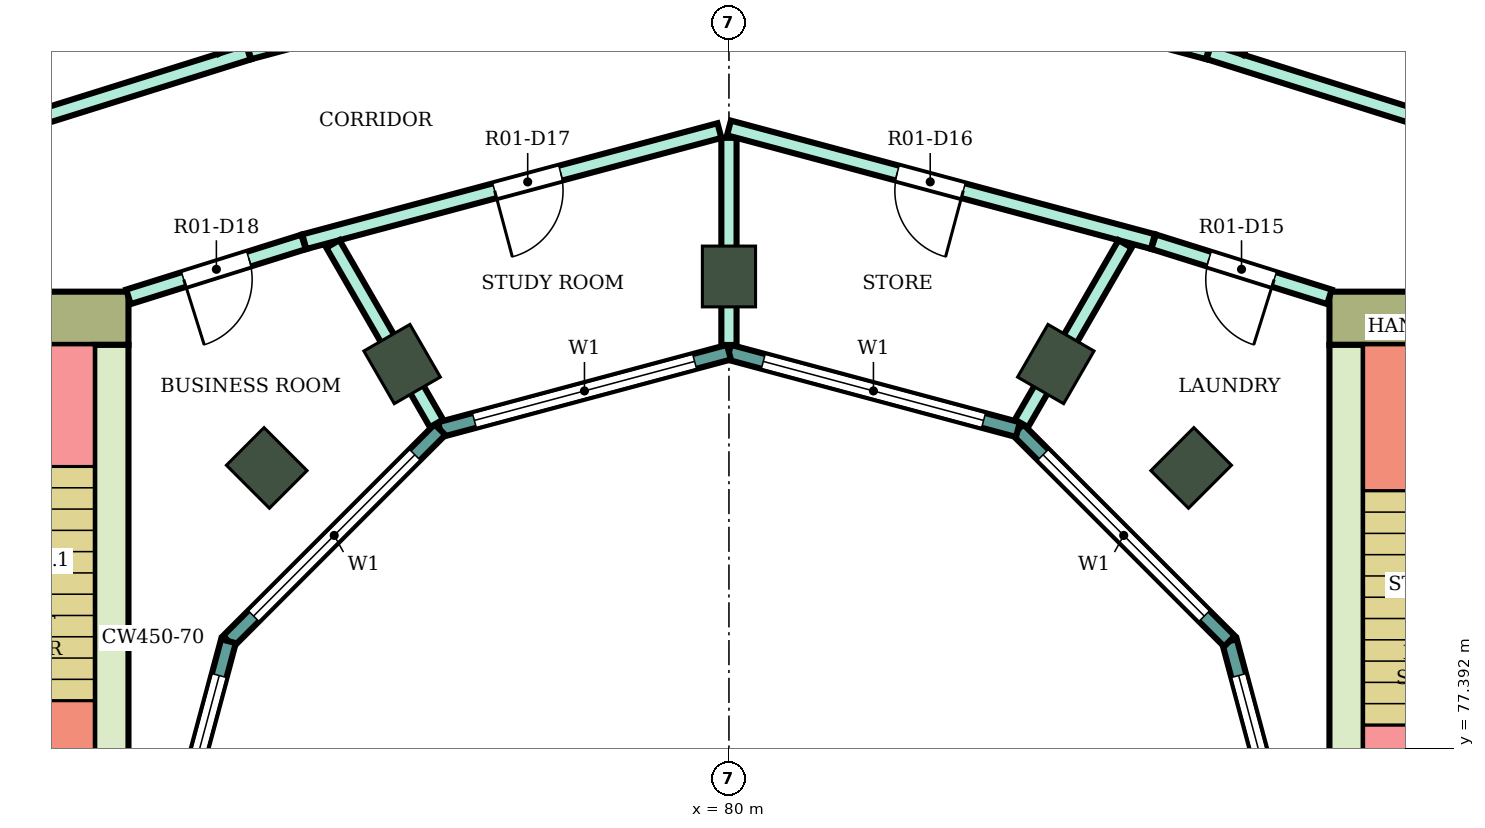
"""IFC4 building model, lengths in metres.
Left out: names, types, materials, properties, quantities, classifications, styles, units other than length and angle.
Written with IfcOpenShell. Run it as: python <this file> out.ifc"""

import sys

from ifc_helpers import new_model, si_unit, direction, frame, frame_2d, origin, origin_2d, place, context, subcontext, project, spatial, rectangle, extrude, element, fill, save


model = new_model("IFC4")
c1 = context("Model", 3, precision=1e-05, world=origin(), true_north=direction((0.0, 1.0)))
c2 = subcontext(c1, "Body", "Model", "MODEL_VIEW")
j1 = project(units=[si_unit("LENGTHUNIT", "METRE"), si_unit("PLANEANGLEUNIT", "RADIAN")], contexts=[c1])
p1 = place(None, origin())
s1 = spatial("IfcSite", under=j1, at=p1, CompositionType="ELEMENT")
p2 = place(p1, origin())
s2 = spatial("IfcBuilding", under=s1, at=p2, CompositionType="ELEMENT")
p3 = place(p2, frame((0.0, 0.0, 165.9)))
s3 = spatial("IfcBuildingStorey", under=s2, at=p3, CompositionType="ELEMENT", Elevation=165.9)
for number, where, z_axis, x_axis in (
    (1, (86.081, 81.081, 0.0), (0.0, 0.0, 1.0), (0.707, 0.707, 0.0)),
    (2, (84.3, 82.448, 0.0), (0.0, 0.0, 1.0), (0.5, 0.866, 0.0)),
    (3, (80.0, 83.6, 0.0), (0.0, 0.0, 1.0), (0.0, 1.0, 0.0)),
    (4, (75.7, 82.448, 0.0), (0.0, 0.0, 1.0), (-0.5, 0.866, 0.0)),
    (5, (73.919, 81.081, 0.0), (0.0, 0.0, 1.0), (-0.707, 0.707, 0.0)),
):
    element("IfcColumn", number, at=place(p3, frame(where, z_axis=z_axis, x_axis=x_axis)), inside=s3, PredefinedType="COLUMN", context=c2, shape_type="SweptSolid", body=[
        extrude(rectangle(XDim=0.8, YDim=0.7, at=origin_2d()), origin(), (0.0, 0.0, 1.0), 4.1),
    ])
p4 = place(p3, frame((87.9, 83.05, 0.0), z_axis=(0.0, 0.0, 1.0), x_axis=(1.0, 0.0, 0.0)))
e6 = element("IfcWall", 6, at=p4, inside=s3, PredefinedType="SHEAR", context=c2, shape_type="SweptSolid", body=[
    extrude(rectangle(XDim=14.8, YDim=0.7, at=frame_2d((7.4, 0.0))), origin(), (0.0, 0.0, 1.0), 3.78),
])
p5 = place(p4, frame((4.2, 0.0, 0.0)))
e7 = element("IfcOpeningElement", 7, at=p5, cuts=e6, PredefinedType="OPENING", context=c2, shape_type="SweptSolid", body=[
    extrude(rectangle(XDim=2.4, YDim=2.4, at=frame_2d((1.2, 1.2))), frame((0.0, 0.36, 0.0), z_axis=(0.0, -1.0, 0.0), x_axis=(1.0, 0.0, 0.0)), (0.0, 0.0, 1.0), 0.72),
])
p6 = place(p3, frame((88.125, 75.0, 0.0), z_axis=(0.0, 0.0, 1.0), x_axis=(0.0, 1.0, 0.0)))
e8 = element("IfcWall", 8, at=p6, inside=s3, PredefinedType="SHEAR", context=c2, shape_type="SweptSolid", body=[
    extrude(rectangle(XDim=7.7, YDim=0.45, at=frame_2d((3.85, 0.0))), origin(), (0.0, 0.0, 1.0), 3.78),
])
p7 = place(p3, frame((72.1, 83.05, 0.0), z_axis=(0.0, 0.0, 1.0), x_axis=(-1.0, 0.0, 0.0)))
e9 = element("IfcWall", 9, at=p7, inside=s3, PredefinedType="SHEAR", context=c2, shape_type="SweptSolid", body=[
    extrude(rectangle(XDim=14.8, YDim=0.7, at=frame_2d((7.4, 0.0))), origin(), (0.0, 0.0, 1.0), 3.78),
])
p8 = place(p7, frame((4.2, 0.0, 0.0)))
e10 = element("IfcOpeningElement", 10, at=p8, cuts=e9, PredefinedType="OPENING", context=c2, shape_type="SweptSolid", body=[
    extrude(rectangle(XDim=2.4, YDim=2.4, at=frame_2d((1.2, 1.2))), frame((0.0, 0.36, 0.0), z_axis=(0.0, -1.0, 0.0), x_axis=(1.0, 0.0, 0.0)), (0.0, 0.0, 1.0), 0.72),
])
p9 = place(p3, frame((71.875, 82.7, 0.0), z_axis=(0.0, 0.0, 1.0), x_axis=(0.0, -1.0, 0.0)))
e11 = element("IfcWall", 11, at=p9, inside=s3, PredefinedType="SHEAR", context=c2, shape_type="SweptSolid", body=[
    extrude(rectangle(XDim=7.7, YDim=0.45, at=frame_2d((3.85, 0.0))), origin(), (0.0, 0.0, 1.0), 3.78),
])
p10 = place(p3, frame((87.604, 75.0, 0.0), z_axis=(0.0, 0.0, 1.0), x_axis=(-0.258789828301, 0.965933654434, 0.0)))
e12 = element("IfcWall", 12, at=p10, inside=s3, PredefinedType="NOTDEFINED", context=c2, shape_type="SweptSolid", body=[
    extrude(rectangle(XDim=3.936, YDim=0.2, at=frame_2d((1.968, 0.0))), origin(), (0.0, 0.0, 1.0), 4.1),
])
p11 = place(p10, frame((0.468, 0.0, 0.9)))
e13 = element("IfcOpeningElement", 13, at=p11, cuts=e12, PredefinedType="OPENING", context=c2, shape_type="SweptSolid", body=[
    extrude(rectangle(XDim=3.0, YDim=2.3, at=frame_2d((1.5, 1.15))), frame((0.0, 0.11, 0.0), z_axis=(0.0, -1.0, 0.0), x_axis=(1.0, 0.0, 0.0)), (0.0, 0.0, 1.0), 0.22),
])
p12 = place(p3, frame((86.585, 78.802, 0.0), z_axis=(0.0, 0.0, 1.0), x_axis=(-0.707106781187, 0.707106781187, 0.0)))
e14 = element("IfcWall", 14, at=p12, inside=s3, PredefinedType="NOTDEFINED", context=c2, shape_type="SweptSolid", body=[
    extrude(rectangle(XDim=3.936, YDim=0.2, at=frame_2d((1.968, 0.0))), origin(), (0.0, 0.0, 1.0), 4.1),
])
p13 = place(p12, frame((0.468, 0.0, 0.9)))
e15 = element("IfcOpeningElement", 15, at=p13, cuts=e14, PredefinedType="OPENING", context=c2, shape_type="SweptSolid", body=[
    extrude(rectangle(XDim=3.0, YDim=2.3, at=frame_2d((1.5, 1.15))), frame((0.0, 0.11, 0.0), z_axis=(0.0, -1.0, 0.0), x_axis=(1.0, 0.0, 0.0)), (0.0, 0.0, 1.0), 0.22),
])
p14 = place(p3, frame((83.802, 81.585, 0.0), z_axis=(0.0, 0.0, 1.0), x_axis=(-0.965933654434, 0.258789828301, 0.0)))
e16 = element("IfcWall", 16, at=p14, inside=s3, PredefinedType="NOTDEFINED", context=c2, shape_type="SweptSolid", body=[
    extrude(rectangle(XDim=3.936, YDim=0.2, at=frame_2d((1.968, 0.0))), origin(), (0.0, 0.0, 1.0), 4.1),
])
p15 = place(p14, frame((0.468, 0.0, 0.9)))
e17 = element("IfcOpeningElement", 17, at=p15, cuts=e16, PredefinedType="OPENING", context=c2, shape_type="SweptSolid", body=[
    extrude(rectangle(XDim=3.0, YDim=2.3, at=frame_2d((1.5, 1.15))), frame((0.0, 0.11, 0.0), z_axis=(0.0, -1.0, 0.0), x_axis=(1.0, 0.0, 0.0)), (0.0, 0.0, 1.0), 0.22),
])
p16 = place(p3, frame((80.0, 82.604, 0.0), z_axis=(0.0, 0.0, 1.0), x_axis=(-0.965933654434, -0.258789828301, 0.0)))
e18 = element("IfcWall", 18, at=p16, inside=s3, PredefinedType="NOTDEFINED", context=c2, shape_type="SweptSolid", body=[
    extrude(rectangle(XDim=3.936, YDim=0.2, at=frame_2d((1.968, 0.0))), origin(), (0.0, 0.0, 1.0), 4.1),
])
p17 = place(p16, frame((0.468, 0.0, 0.9)))
e19 = element("IfcOpeningElement", 19, at=p17, cuts=e18, PredefinedType="OPENING", context=c2, shape_type="SweptSolid", body=[
    extrude(rectangle(XDim=3.0, YDim=2.3, at=frame_2d((1.5, 1.15))), frame((0.0, 0.11, 0.0), z_axis=(0.0, -1.0, 0.0), x_axis=(1.0, 0.0, 0.0)), (0.0, 0.0, 1.0), 0.22),
])
p18 = place(p3, frame((76.198, 81.585, 0.0), z_axis=(0.0, 0.0, 1.0), x_axis=(-0.707106781187, -0.707106781187, 0.0)))
e20 = element("IfcWall", 20, at=p18, inside=s3, PredefinedType="NOTDEFINED", context=c2, shape_type="SweptSolid", body=[
    extrude(rectangle(XDim=3.936, YDim=0.2, at=frame_2d((1.968, 0.0))), origin(), (0.0, 0.0, 1.0), 4.1),
])
p19 = place(p18, frame((0.468, 0.0, 0.9)))
e21 = element("IfcOpeningElement", 21, at=p19, cuts=e20, PredefinedType="OPENING", context=c2, shape_type="SweptSolid", body=[
    extrude(rectangle(XDim=3.0, YDim=2.3, at=frame_2d((1.5, 1.15))), frame((0.0, 0.11, 0.0), z_axis=(0.0, -1.0, 0.0), x_axis=(1.0, 0.0, 0.0)), (0.0, 0.0, 1.0), 0.22),
])
p20 = place(p3, frame((73.415, 78.802, 0.0), z_axis=(0.0, 0.0, 1.0), x_axis=(-0.258789828301, -0.965933654434, 0.0)))
e22 = element("IfcWall", 22, at=p20, inside=s3, PredefinedType="NOTDEFINED", context=c2, shape_type="SweptSolid", body=[
    extrude(rectangle(XDim=3.936, YDim=0.2, at=frame_2d((1.968, 0.0))), origin(), (0.0, 0.0, 1.0), 4.1),
])
p21 = place(p20, frame((0.468, 0.0, 0.9)))
e23 = element("IfcOpeningElement", 23, at=p21, cuts=e22, PredefinedType="OPENING", context=c2, shape_type="SweptSolid", body=[
    extrude(rectangle(XDim=3.0, YDim=2.3, at=frame_2d((1.5, 1.15))), frame((0.0, 0.11, 0.0), z_axis=(0.0, -1.0, 0.0), x_axis=(1.0, 0.0, 0.0)), (0.0, 0.0, 1.0), 0.22),
])
p22 = place(p3, frame((68.2, 84.834, 0.0), z_axis=(0.0, 0.0, 1.0), x_axis=(0.954272398161, 0.298938438661, 0.0)))
e24 = element("IfcWall", 24, at=p22, inside=s3, PredefinedType="PARTITIONING", context=c2, shape_type="SweptSolid", body=[
    extrude(rectangle(XDim=5.74, YDim=0.2, at=frame_2d((2.87, 0.0))), origin(), (0.0, 0.0, 1.0), 3.65),
])
p23 = place(p3, frame((72.1, 83.332, 0.0), z_axis=(0.0, 0.0, 1.0), x_axis=(0.954233106619, 0.299063836383, 0.0)))
e25 = element("IfcWall", 25, at=p23, inside=s3, PredefinedType="PARTITIONING", context=c2, shape_type="SweptSolid", body=[
    extrude(rectangle(XDim=2.414, YDim=0.2, at=frame_2d((1.207, 0.0))), origin(), (0.0, 0.0, 1.0), 3.65),
])
p24 = place(p23, frame((0.762, 0.0, 0.0)))
e26 = element("IfcOpeningElement", 26, at=p24, cuts=e25, PredefinedType="OPENING", context=c2, shape_type="SweptSolid", body=[
    extrude(rectangle(XDim=0.9, YDim=2.1, at=frame_2d((0.45, 1.05))), frame((0.0, 0.11, 0.0), z_axis=(0.0, -1.0, 0.0), x_axis=(1.0, 0.0, 0.0)), (0.0, 0.0, 1.0), 0.22),
])
p25 = place(p3, frame((73.687, 86.554, 0.0), z_axis=(0.0, 0.0, 1.0), x_axis=(0.965999420828, 0.258544230182, 0.0)))
e27 = element("IfcWall", 27, at=p25, inside=s3, PredefinedType="PARTITIONING", context=c2, shape_type="SweptSolid", body=[
    extrude(rectangle(XDim=6.446, YDim=0.2, at=frame_2d((3.223, 0.0))), origin(), (0.0, 0.0, 1.0), 3.65),
])
p26 = place(p25, frame((3.638, 0.0, 0.0)))
e28 = element("IfcOpeningElement", 28, at=p26, cuts=e27, PredefinedType="OPENING", context=c2, shape_type="SweptSolid", body=[
    extrude(rectangle(XDim=1.0, YDim=2.1, at=frame_2d((0.5, 1.05))), frame((0.0, 0.11, 0.0), z_axis=(0.0, -1.0, 0.0), x_axis=(1.0, 0.0, 0.0)), (0.0, 0.0, 1.0), 0.22),
])
p27 = place(p3, frame((74.413, 84.057, 0.0), z_axis=(0.0, 0.0, 1.0), x_axis=(0.965972135939, 0.258646153246, 0.0)))
e29 = element("IfcWall", 29, at=p27, inside=s3, PredefinedType="PARTITIONING", context=c2, shape_type="SweptSolid", body=[
    extrude(rectangle(XDim=5.654, YDim=0.2, at=frame_2d((2.827, 0.0))), origin(), (0.0, 0.0, 1.0), 3.65),
])
p28 = place(p27, frame((2.593, 0.0, 0.0)))
e30 = element("IfcOpeningElement", 30, at=p28, cuts=e29, PredefinedType="OPENING", context=c2, shape_type="SweptSolid", body=[
    extrude(rectangle(XDim=0.9, YDim=2.1, at=frame_2d((0.45, 1.05))), frame((0.0, 0.11, 0.0), z_axis=(0.0, -1.0, 0.0), x_axis=(1.0, 0.0, 0.0)), (0.0, 0.0, 1.0), 0.22),
])
p29 = place(p3, frame((74.79, 84.028, 0.0), z_axis=(0.0, 0.0, 1.0), x_axis=(0.499905962189, -0.866079689733, 0.0)))
e31 = element("IfcWall", 31, at=p29, inside=s3, PredefinedType="PARTITIONING", context=c2, shape_type="SweptSolid", body=[
    extrude(rectangle(XDim=2.726, YDim=0.2, at=frame_2d((1.363, 0.0))), origin(), (0.0, 0.0, 1.0), 3.65),
])
p30 = place(p3, frame((80.0, 82.699, 0.0), z_axis=(0.0, 0.0, 1.0), x_axis=(0.0, 1.0, 0.0)))
e32 = element("IfcWall", 32, at=p30, inside=s3, PredefinedType="PARTITIONING", context=c2, shape_type="SweptSolid", body=[
    extrude(rectangle(XDim=2.725, YDim=0.2, at=frame_2d((1.363, 0.0))), origin(), (0.0, 0.0, 1.0), 3.65),
])
p31 = place(p3, frame((80.0, 85.554, 0.0), z_axis=(0.0, 0.0, 1.0), x_axis=(0.965928989968, -0.258807237802, 0.0)))
e33 = element("IfcWall", 33, at=p31, inside=s3, PredefinedType="PARTITIONING", context=c2, shape_type="SweptSolid", body=[
    extrude(rectangle(XDim=5.774, YDim=0.2, at=frame_2d((2.887, 0.0))), origin(), (0.0, 0.0, 1.0), 3.65),
])
p32 = place(p31, frame((2.292, 0.0, 0.0)))
e34 = element("IfcOpeningElement", 34, at=p32, cuts=e33, PredefinedType="OPENING", context=c2, shape_type="SweptSolid", body=[
    extrude(rectangle(XDim=0.9, YDim=2.1, at=frame_2d((0.45, 1.05))), frame((0.0, 0.11, 0.0), z_axis=(0.0, -1.0, 0.0), x_axis=(1.0, 0.0, 0.0)), (0.0, 0.0, 1.0), 0.22),
])
p33 = place(p3, frame((80.087, 88.223, 0.0), z_axis=(0.0, 0.0, 1.0), x_axis=(0.965852330757, -0.25909317855, 0.0)))
e35 = element("IfcWall", 35, at=p33, inside=s3, PredefinedType="PARTITIONING", context=c2, shape_type="SweptSolid", body=[
    extrude(rectangle(XDim=6.436, YDim=0.2, at=frame_2d((3.218, 0.0))), origin(), (0.0, 0.0, 1.0), 3.65),
])
p34 = place(p33, frame((2.678, 0.0, 0.0)))
e36 = element("IfcOpeningElement", 36, at=p34, cuts=e35, PredefinedType="OPENING", context=c2, shape_type="SweptSolid", body=[
    extrude(rectangle(XDim=1.0, YDim=2.1, at=frame_2d((0.5, 1.05))), frame((0.0, 0.11, 0.0), z_axis=(0.0, -1.0, 0.0), x_axis=(1.0, 0.0, 0.0)), (0.0, 0.0, 1.0), 0.22),
])
p35 = place(p3, frame((83.848, 81.667, 0.0), z_axis=(0.0, 0.0, 1.0), x_axis=(0.500185068774, 0.865918527909, 0.0)))
e37 = element("IfcWall", 37, at=p35, inside=s3, PredefinedType="PARTITIONING", context=c2, shape_type="SweptSolid", body=[
    extrude(rectangle(XDim=2.726, YDim=0.2, at=frame_2d((1.363, 0.0))), origin(), (0.0, 0.0, 1.0), 3.65),
])
p36 = place(p3, frame((85.587, 84.057, 0.0), z_axis=(0.0, 0.0, 1.0), x_axis=(0.954239513179, -0.299043393987, 0.0)))
e38 = element("IfcWall", 38, at=p36, inside=s3, PredefinedType="PARTITIONING", context=c2, shape_type="SweptSolid", body=[
    extrude(rectangle(XDim=2.424, YDim=0.2, at=frame_2d((1.212, 0.0))), origin(), (0.0, 0.0, 1.0), 3.65),
])
p37 = place(p36, frame((0.762, 0.0, 0.0)))
e39 = element("IfcOpeningElement", 39, at=p37, cuts=e38, PredefinedType="OPENING", context=c2, shape_type="SweptSolid", body=[
    extrude(rectangle(XDim=0.9, YDim=2.1, at=frame_2d((0.45, 1.05))), frame((0.0, 0.11, 0.0), z_axis=(0.0, -1.0, 0.0), x_axis=(1.0, 0.0, 0.0)), (0.0, 0.0, 1.0), 0.22),
])
p38 = place(p3, frame((86.313, 86.555, 0.0), z_axis=(0.0, 0.0, 1.0), x_axis=(0.953919398959, -0.300062960544, 0.0)))
e40 = element("IfcWall", 40, at=p38, inside=s3, PredefinedType="PARTITIONING", context=c2, shape_type="SweptSolid", body=[
    extrude(rectangle(XDim=5.721, YDim=0.2, at=frame_2d((2.86, 0.0))), origin(), (0.0, 0.0, 1.0), 3.65),
])
p39 = place(p3, frame((86.677, 86.564, 0.0), z_axis=(0.0, 0.0, 1.0), x_axis=(0.500120377296, 0.865955892764, 0.0)))
e41 = element("IfcWall", 41, at=p39, inside=s3, PredefinedType="PARTITIONING", context=c2, shape_type="SweptSolid", body=[
    extrude(rectangle(XDim=12.445, YDim=0.2, at=frame_2d((6.222, 0.0))), origin(), (0.0, 0.0, 1.0), 3.65),
])
p40 = place(p3, frame((67.101, 97.342, 0.0), z_axis=(0.0, 0.0, 1.0), x_axis=(0.499929451451, -0.866066131177, 0.0)))
e42 = element("IfcWall", 42, at=p40, inside=s3, PredefinedType="PARTITIONING", context=c2, shape_type="SweptSolid", body=[
    extrude(rectangle(XDim=12.456, YDim=0.1, at=frame_2d((6.228, 0.0))), origin(), (0.0, 0.0, 1.0), 3.65),
])
p41 = place(p40, frame((2.434, 0.0, 0.0)))
e43 = element("IfcOpeningElement", 43, at=p41, cuts=e42, PredefinedType="OPENING", context=c2, shape_type="SweptSolid", body=[
    extrude(rectangle(XDim=0.9, YDim=2.1, at=frame_2d((0.45, 1.05))), frame((0.0, 0.06, 0.0), z_axis=(0.0, -1.0, 0.0), x_axis=(1.0, 0.0, 0.0)), (0.0, 0.0, 1.0), 0.12),
])
p42 = place(p11, origin())
e44 = element("IfcWindow", 44, at=p42, inside=s3, PartitioningType="SINGLE_PANEL", PredefinedType="WINDOW", context=c2, shape_type="SweptSolid", body=[
    extrude(rectangle(XDim=3.0, YDim=2.3, at=frame_2d((1.5, 1.15))), frame((0.0, 0.03, 0.0), z_axis=(0.0, -1.0, 0.0), x_axis=(1.0, 0.0, 0.0)), (0.0, 0.0, 1.0), 0.06),
])
fill(e13, e44)
p43 = place(p13, origin())
e45 = element("IfcWindow", 45, at=p43, inside=s3, PartitioningType="SINGLE_PANEL", PredefinedType="WINDOW", context=c2, shape_type="SweptSolid", body=[
    extrude(rectangle(XDim=3.0, YDim=2.3, at=frame_2d((1.5, 1.15))), frame((0.0, 0.03, 0.0), z_axis=(0.0, -1.0, 0.0), x_axis=(1.0, 0.0, 0.0)), (0.0, 0.0, 1.0), 0.06),
])
fill(e15, e45)
p44 = place(p15, origin())
e46 = element("IfcWindow", 46, at=p44, inside=s3, PartitioningType="SINGLE_PANEL", PredefinedType="WINDOW", context=c2, shape_type="SweptSolid", body=[
    extrude(rectangle(XDim=3.0, YDim=2.3, at=frame_2d((1.5, 1.15))), frame((0.0, 0.03, 0.0), z_axis=(0.0, -1.0, 0.0), x_axis=(1.0, 0.0, 0.0)), (0.0, 0.0, 1.0), 0.06),
])
fill(e17, e46)
p45 = place(p17, origin())
e47 = element("IfcWindow", 47, at=p45, inside=s3, PartitioningType="SINGLE_PANEL", PredefinedType="WINDOW", context=c2, shape_type="SweptSolid", body=[
    extrude(rectangle(XDim=3.0, YDim=2.3, at=frame_2d((1.5, 1.15))), frame((0.0, 0.03, 0.0), z_axis=(0.0, -1.0, 0.0), x_axis=(1.0, 0.0, 0.0)), (0.0, 0.0, 1.0), 0.06),
])
fill(e19, e47)
p46 = place(p19, origin())
e48 = element("IfcWindow", 48, at=p46, inside=s3, PartitioningType="SINGLE_PANEL", PredefinedType="WINDOW", context=c2, shape_type="SweptSolid", body=[
    extrude(rectangle(XDim=3.0, YDim=2.3, at=frame_2d((1.5, 1.15))), frame((0.0, 0.03, 0.0), z_axis=(0.0, -1.0, 0.0), x_axis=(1.0, 0.0, 0.0)), (0.0, 0.0, 1.0), 0.06),
])
fill(e21, e48)
p47 = place(p21, origin())
e49 = element("IfcWindow", 49, at=p47, inside=s3, PartitioningType="SINGLE_PANEL", PredefinedType="WINDOW", context=c2, shape_type="SweptSolid", body=[
    extrude(rectangle(XDim=3.0, YDim=2.3, at=frame_2d((1.5, 1.15))), frame((0.0, 0.03, 0.0), z_axis=(0.0, -1.0, 0.0), x_axis=(1.0, 0.0, 0.0)), (0.0, 0.0, 1.0), 0.06),
])
fill(e23, e49)
p48 = place(p37, frame((0.9, 0.0, 0.0), z_axis=(0.0, 0.0, 1.0), x_axis=(-1.0, 0.0, 0.0)))
e50 = element("IfcDoor", 50, at=p48, inside=s3, OperationType="SINGLE_SWING_LEFT", PredefinedType="DOOR", context=c2, shape_type="SweptSolid", body=[
    extrude(rectangle(XDim=0.9, YDim=2.1, at=frame_2d((0.45, 1.05))), frame((0.0, 0.025, 0.0), z_axis=(0.0, -1.0, 0.0), x_axis=(1.0, 0.0, 0.0)), (0.0, 0.0, 1.0), 0.05),
])
fill(e39, e50)
p49 = place(p32, frame((0.9, 0.0, 0.0), z_axis=(0.0, 0.0, 1.0), x_axis=(-1.0, 0.0, 0.0)))
e51 = element("IfcDoor", 51, at=p49, inside=s3, OperationType="SINGLE_SWING_LEFT", PredefinedType="DOOR", context=c2, shape_type="SweptSolid", body=[
    extrude(rectangle(XDim=0.9, YDim=2.1, at=frame_2d((0.45, 1.05))), frame((0.0, 0.025, 0.0), z_axis=(0.0, -1.0, 0.0), x_axis=(1.0, 0.0, 0.0)), (0.0, 0.0, 1.0), 0.05),
])
fill(e34, e51)
p50 = place(p28, frame((0.9, 0.0, 0.0), z_axis=(0.0, 0.0, 1.0), x_axis=(-1.0, 0.0, 0.0)))
e52 = element("IfcDoor", 52, at=p50, inside=s3, OperationType="SINGLE_SWING_RIGHT", PredefinedType="DOOR", context=c2, shape_type="SweptSolid", body=[
    extrude(rectangle(XDim=0.9, YDim=2.1, at=frame_2d((0.45, 1.05))), frame((0.0, 0.025, 0.0), z_axis=(0.0, -1.0, 0.0), x_axis=(1.0, 0.0, 0.0)), (0.0, 0.0, 1.0), 0.05),
])
fill(e30, e52)
p51 = place(p24, frame((0.9, 0.0, 0.0), z_axis=(0.0, 0.0, 1.0), x_axis=(-1.0, 0.0, 0.0)))
e53 = element("IfcDoor", 53, at=p51, inside=s3, OperationType="SINGLE_SWING_RIGHT", PredefinedType="DOOR", context=c2, shape_type="SweptSolid", body=[
    extrude(rectangle(XDim=0.9, YDim=2.1, at=frame_2d((0.45, 1.05))), frame((0.0, 0.025, 0.0), z_axis=(0.0, -1.0, 0.0), x_axis=(1.0, 0.0, 0.0)), (0.0, 0.0, 1.0), 0.05),
])
fill(e26, e53)
save(model, sys.argv[1])
